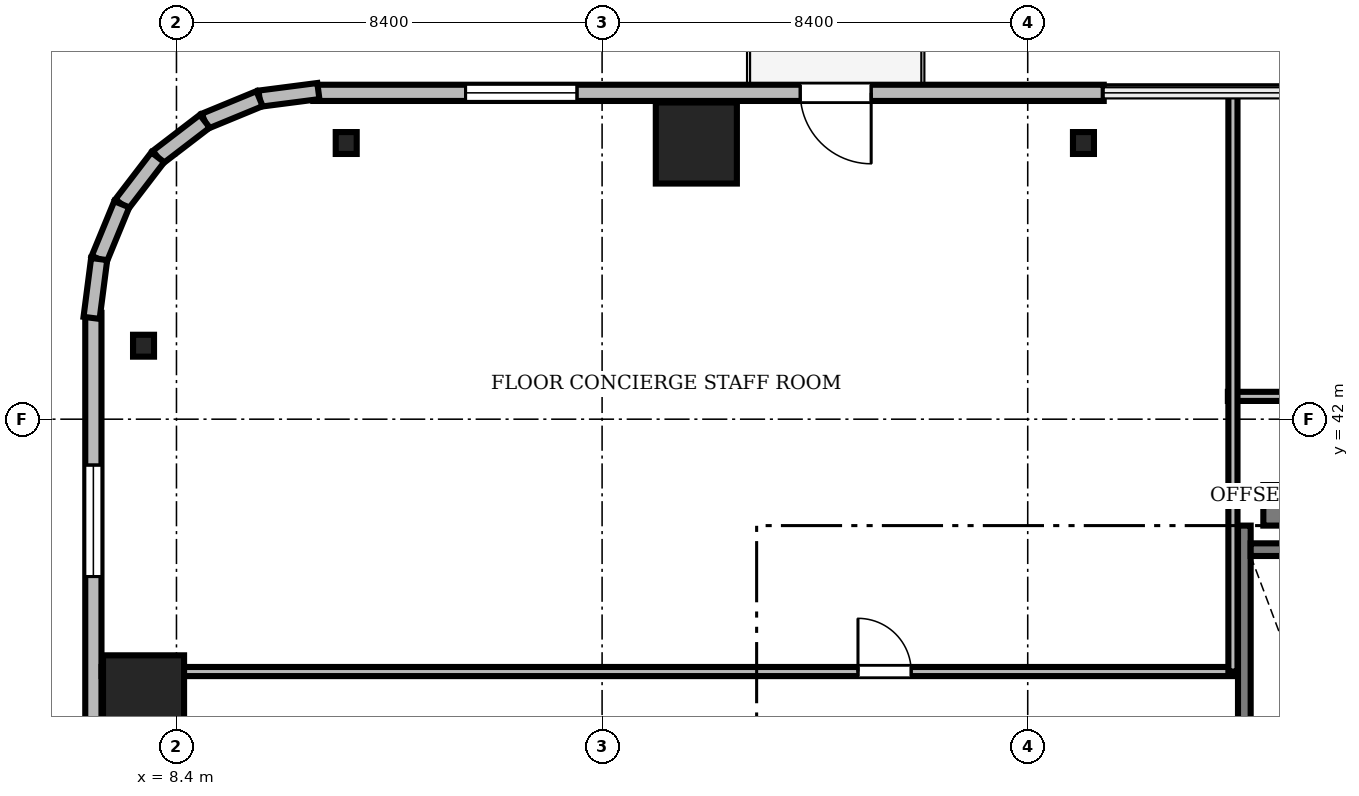
"""IFC4 building model, lengths in metres.
Left out: names, types, materials, properties, quantities, classifications, styles, units other than length and angle.
Written with IfcOpenShell. Run it as: python <this file> out.ifc"""

import sys

from ifc_helpers import new_model, si_unit, direction, frame, frame_2d, origin, origin_2d, place, context, subcontext, project, spatial, rectangle, i_section, extrude, source, transform, mapped, element, fill, save


model = new_model("IFC4")
c1 = context("Model", 3, precision=1e-05, world=origin(), true_north=direction((0.0, 1.0)))
c2 = subcontext(c1, "Body", "Model", "MODEL_VIEW")
j1 = project(units=[si_unit("LENGTHUNIT", "METRE"), si_unit("PLANEANGLEUNIT", "RADIAN")], contexts=[c1])
p1 = place(None, origin())
s1 = spatial("IfcSite", under=j1, at=p1, CompositionType="ELEMENT")
p2 = place(p1, origin())
s2 = spatial("IfcBuilding", under=s1, at=p2, CompositionType="ELEMENT")
p3 = place(p2, frame((0.0, 0.0, 159.4)))
s3 = spatial("IfcBuildingStorey", under=s2, at=p3, CompositionType="ELEMENT", Elevation=159.4)
m1 = source(origin(), c2, "Body", "SweptSolid", [
    extrude(rectangle(XDim=17.52, YDim=0.8, at=frame_2d((8.76, 0.0))), origin(), (0.0, 0.0, 1.0), 3.46),
])
p4 = place(p3, frame((29.85, 40.3, 0.0), z_axis=(0.0, 0.0, 1.0), x_axis=(1.0, 0.0, 0.0)))
e1 = element("IfcWall", 1, at=p4, inside=s3, PredefinedType="SHEAR", context=c2, shape_type="MappedRepresentation", body=[
    mapped(m1, transform((0.0, 0.0, 0.0), scale=1.0)),
])
m2 = source(origin(), c2, "Body", "SweptSolid", [
    extrude(rectangle(XDim=1.6, YDim=1.6, at=origin_2d()), origin(), (0.0, 0.0, 1.0), 3.46),
])
for number, where, z_axis, x_axis in (
    (2, (18.66, 47.45, 0.0), (0.0, 0.0, 1.0), (1.0, 0.0, 0.0)),
    (3, (7.75, 36.54, 0.0), (0.0, 0.0, 1.0), (1.0, 0.0, 0.0)),
):
    element("IfcColumn", number, at=place(p3, frame(where, z_axis=z_axis, x_axis=x_axis)), inside=s3, PredefinedType="COLUMN", context=c2, shape_type="MappedRepresentation", body=[
        mapped(m2, transform((0.0, 0.0, 0.0), scale=1.0)),
    ])
m3 = source(origin(), c2, "Body", "SweptSolid", [
    extrude(i_section(OverallWidth=0.414, OverallDepth=0.432, WebThickness=0.026, FlangeThickness=0.04, FilletRadius=0.015, at=origin_2d()), origin(), (0.0, 0.0, 1.0), 3.46),
])
for number, where, z_axis, x_axis in (
    (4, (26.3, 47.45, 0.0), (0.0, 0.0, 1.0), (1.0, 0.0, 0.0)),
    (5, (11.75, 47.45, 0.0), (0.0, 0.0, 1.0), (1.0, 0.0, 0.0)),
    (6, (7.75, 43.45, 0.0), (0.0, 0.0, 1.0), (1.0, 0.0, 0.0)),
):
    element("IfcColumn", number, at=place(p3, frame(where, z_axis=z_axis, x_axis=x_axis)), inside=s3, PredefinedType="COLUMN", context=c2, shape_type="MappedRepresentation", body=[
        mapped(m3, transform((0.0, 0.0, 0.0), scale=1.0)),
    ])
m4 = source(origin(), c2, "Body", "SweptSolid", [
    extrude(rectangle(XDim=15.6, YDim=0.32, at=frame_2d((7.8, 0.0))), origin(), (0.0, 0.0, 1.0), 3.46),
])
p5 = place(p3, frame((26.7, 48.44, 0.0), z_axis=(0.0, 0.0, 1.0), x_axis=(-1.0, 0.0, 0.0)))
e7 = element("IfcWall", 7, at=p5, inside=s3, PredefinedType="SOLIDWALL", context=c2, shape_type="MappedRepresentation", body=[
    mapped(m4, transform((0.0, 0.0, 0.0), scale=1.0)),
])
m5 = source(origin(), c2, "Body", "SweptSolid", [
    extrude(rectangle(XDim=1.4, YDim=2.3, at=frame_2d((0.7, 1.15))), frame((0.0, 0.17, 0.0), z_axis=(0.0, -1.0, 0.0), x_axis=(1.0, 0.0, 0.0)), (0.0, 0.0, 1.0), 0.34),
])
p6 = place(p5, frame((4.59, 0.0, 0.0)))
e8 = element("IfcOpeningElement", 8, at=p6, cuts=e7, PredefinedType="OPENING", context=c2, shape_type="MappedRepresentation", body=[
    mapped(m5, transform((0.0, 0.0, 0.0), scale=1.0)),
])
m6 = source(origin(), c2, "Body", "SweptSolid", [
    extrude(rectangle(XDim=2.2, YDim=2.4, at=frame_2d((1.1, 1.2))), frame((0.0, 0.17, 0.0), z_axis=(0.0, -1.0, 0.0), x_axis=(1.0, 0.0, 0.0)), (0.0, 0.0, 1.0), 0.34),
])
p7 = place(p5, frame((10.395, 0.0, 0.72)))
e9 = element("IfcOpeningElement", 9, at=p7, cuts=e7, PredefinedType="OPENING", context=c2, shape_type="MappedRepresentation", body=[
    mapped(m6, transform((0.0, 0.0, 0.0), scale=1.0)),
])
m7 = source(origin(), c2, "Body", "SweptSolid", [
    extrude(rectangle(XDim=15.6, YDim=0.32, at=frame_2d((7.8, 0.0))), origin(), (0.0, 0.0, 1.0), 3.46),
])
p8 = place(p3, frame((6.76, 44.1, 0.0), z_axis=(0.0, 0.0, 1.0), x_axis=(0.0, -1.0, 0.0)))
e10 = element("IfcWall", 10, at=p8, inside=s3, PredefinedType="SOLIDWALL", context=c2, shape_type="MappedRepresentation", body=[
    mapped(m7, transform((0.0, 0.0, 0.0), scale=1.0)),
])
p9 = place(p8, frame((3.005, 0.0, 0.72)))
e11 = element("IfcOpeningElement", 11, at=p9, cuts=e10, PredefinedType="OPENING", context=c2, shape_type="MappedRepresentation", body=[
    mapped(m6, transform((0.0, 0.0, 0.0), scale=1.0)),
])
m8 = source(origin(), c2, "Body", "SweptSolid", [
    extrude(rectangle(XDim=1.17, YDim=0.32, at=frame_2d((0.585, 0.0))), origin(), (0.0, 0.0, 1.0), 3.46),
])
p10 = place(p3, frame((11.2, 48.476, 0.0), z_axis=(0.0, 0.0, 1.0), x_axis=(-0.991735963317, -0.128295670475, 0.0)))
e12 = element("IfcWall", 12, at=p10, inside=s3, PredefinedType="SOLIDWALL", context=c2, shape_type="MappedRepresentation", body=[
    mapped(m8, transform((0.0, 0.0, 0.0), scale=1.0)),
])
m9 = source(origin(), c2, "Body", "SweptSolid", [
    extrude(rectangle(XDim=1.169, YDim=0.32, at=frame_2d((0.584, 0.0))), origin(), (0.0, 0.0, 1.0), 3.46),
])
p11 = place(p3, frame((10.04, 48.325, 0.0), z_axis=(0.0, 0.0, 1.0), x_axis=(-0.924552646638, -0.381054331552, 0.0)))
e13 = element("IfcWall", 13, at=p11, inside=s3, PredefinedType="SOLIDWALL", context=c2, shape_type="MappedRepresentation", body=[
    mapped(m9, transform((0.0, 0.0, 0.0), scale=1.0)),
])
m10 = source(origin(), c2, "Body", "SweptSolid", [
    extrude(rectangle(XDim=1.169, YDim=0.32, at=frame_2d((0.584, 0.0))), origin(), (0.0, 0.0, 1.0), 3.46),
])
p12 = place(p3, frame((8.959, 47.88, 0.0), z_axis=(0.0, 0.0, 1.0), x_axis=(-0.793663520347, -0.608356981114, 0.0)))
e14 = element("IfcWall", 14, at=p12, inside=s3, PredefinedType="SOLIDWALL", context=c2, shape_type="MappedRepresentation", body=[
    mapped(m10, transform((0.0, 0.0, 0.0), scale=1.0)),
])
m11 = source(origin(), c2, "Body", "SweptSolid", [
    extrude(rectangle(XDim=1.169, YDim=0.32, at=frame_2d((0.584, 0.0))), origin(), (0.0, 0.0, 1.0), 3.46),
])
p13 = place(p3, frame((8.031, 47.169, 0.0), z_axis=(0.0, 0.0, 1.0), x_axis=(-0.608387696831, -0.793639975269, 0.0)))
e15 = element("IfcWall", 15, at=p13, inside=s3, PredefinedType="SOLIDWALL", context=c2, shape_type="MappedRepresentation", body=[
    mapped(m11, transform((0.0, 0.0, 0.0), scale=1.0)),
])
p14 = place(p3, frame((7.32, 46.241, 0.0), z_axis=(0.0, 0.0, 1.0), x_axis=(-0.381054331552, -0.924552646638, 0.0)))
e16 = element("IfcWall", 16, at=p14, inside=s3, PredefinedType="SOLIDWALL", context=c2, shape_type="MappedRepresentation", body=[
    mapped(m9, transform((0.0, 0.0, 0.0), scale=1.0)),
])
p15 = place(p3, frame((6.875, 45.16, 0.0), z_axis=(0.0, 0.0, 1.0), x_axis=(-0.128295670475, -0.991735963317, 0.0)))
e17 = element("IfcWall", 17, at=p15, inside=s3, PredefinedType="SOLIDWALL", context=c2, shape_type="MappedRepresentation", body=[
    mapped(m8, transform((0.0, 0.0, 0.0), scale=1.0)),
])
m12 = source(origin(), c2, "Body", "SweptSolid", [
    extrude(rectangle(XDim=9.25, YDim=0.25, at=frame_2d((4.625, 0.0))), origin(), (0.0, 0.0, 1.0), 3.5),
])
p16 = place(p3, frame((29.475, 30.65, 0.0), z_axis=(0.0, 0.0, 1.0), x_axis=(0.0, 1.0, 0.0)))
e18 = element("IfcWall", 18, at=p16, inside=s3, PredefinedType="SOLIDWALL", context=c2, shape_type="MappedRepresentation", body=[
    mapped(m12, transform((0.0, 0.0, 0.0), scale=1.0)),
])
m13 = source(origin(), c2, "Body", "SweptSolid", [
    extrude(rectangle(XDim=3.15, YDim=0.25, at=frame_2d((1.575, 0.0))), origin(), (0.0, 0.0, 1.0), 3.5),
])
p17 = place(p3, frame((29.6, 39.425, 0.0), z_axis=(0.0, 0.0, 1.0), x_axis=(1.0, 0.0, 0.0)))
e19 = element("IfcWall", 19, at=p17, inside=s3, PredefinedType="SOLIDWALL", context=c2, shape_type="MappedRepresentation", body=[
    mapped(m13, transform((0.0, 0.0, 0.0), scale=1.0)),
])
m14 = source(origin(), c2, "Body", "SweptSolid", [
    extrude(rectangle(XDim=23.928, YDim=0.18, at=frame_2d((11.964, 0.0))), origin(), (0.0, 0.0, 1.0), 2.702),
])
p18 = place(p3, frame((29.15, 42.45, 0.0), z_axis=(0.0, 0.0, 1.0), x_axis=(1.0, 0.0, 0.0)))
e20 = element("IfcWall", 20, at=p18, inside=s3, PredefinedType="PARTITIONING", context=c2, shape_type="MappedRepresentation", body=[
    mapped(m14, transform((0.0, 0.0, 0.0), scale=1.0)),
])
m15 = source(origin(), c2, "Body", "SweptSolid", [
    extrude(rectangle(XDim=1.05, YDim=2.2, at=frame_2d((0.525, 1.1))), frame((0.0, 0.1, 0.0), z_axis=(0.0, -1.0, 0.0), x_axis=(1.0, 0.0, 0.0)), (0.0, 0.0, 1.0), 0.2),
])
p19 = place(p18, frame((4.5, 0.0, 0.0)))
e21 = element("IfcOpeningElement", 21, at=p19, cuts=e20, PredefinedType="OPENING", context=c2, shape_type="MappedRepresentation", body=[
    mapped(m15, transform((0.0, 0.0, 0.0), scale=1.0)),
])
m16 = source(origin(), c2, "Body", "SweptSolid", [
    extrude(rectangle(XDim=22.328, YDim=0.18, at=frame_2d((11.164, 0.0))), origin(), (0.0, 0.0, 1.0), 2.702),
])
p20 = place(p3, frame((6.922, 37.02, 0.0), z_axis=(0.0, 0.0, 1.0), x_axis=(1.0, 0.0, 0.0)))
e22 = element("IfcWall", 22, at=p20, inside=s3, PredefinedType="PARTITIONING", context=c2, shape_type="MappedRepresentation", body=[
    mapped(m16, transform((0.0, 0.0, 0.0), scale=1.0)),
])
p21 = place(p20, frame((14.928, 0.0, 0.0)))
e23 = element("IfcOpeningElement", 23, at=p21, cuts=e22, PredefinedType="OPENING", context=c2, shape_type="MappedRepresentation", body=[
    mapped(m15, transform((0.0, 0.0, 0.0), scale=1.0)),
])
m17 = source(origin(), c2, "Body", "SweptSolid", [
    extrude(rectangle(XDim=11.45, YDim=0.18, at=frame_2d((5.725, 0.0))), origin(), (0.0, 0.0, 1.0), 2.702),
])
p22 = place(p3, frame((29.25, 37.02, 0.0), z_axis=(0.0, 0.0, 1.0), x_axis=(0.0, 1.0, 0.0)))
e24 = element("IfcWall", 24, at=p22, inside=s3, PredefinedType="PARTITIONING", context=c2, shape_type="MappedRepresentation", body=[
    mapped(m17, transform((0.0, 0.0, 0.0), scale=1.0)),
])
m18 = source(origin(), c2, "Body", "SweptSolid", [
    extrude(rectangle(XDim=1.4, YDim=2.3, at=frame_2d((0.7, 1.15))), frame((0.0, 0.025, 0.0), z_axis=(0.0, -1.0, 0.0), x_axis=(1.0, 0.0, 0.0)), (0.0, 0.0, 1.0), 0.05),
])
p23 = place(p6, frame((1.4, 0.0, 0.0), z_axis=(0.0, 0.0, 1.0), x_axis=(-1.0, 0.0, 0.0)))
e25 = element("IfcDoor", 25, at=p23, inside=s3, OperationType="DOUBLE_DOOR_SLIDING", PredefinedType="DOOR", context=c2, shape_type="MappedRepresentation", body=[
    mapped(m18, transform((0.0, 0.0, 0.0), scale=1.0)),
])
fill(e8, e25)
m19 = source(origin(), c2, "Body", "SweptSolid", [
    extrude(rectangle(XDim=2.2, YDim=2.4, at=frame_2d((1.1, 1.2))), frame((0.0, 0.03, 0.0), z_axis=(0.0, -1.0, 0.0), x_axis=(1.0, 0.0, 0.0)), (0.0, 0.0, 1.0), 0.06),
])
p24 = place(p7, origin())
e26 = element("IfcWindow", 26, at=p24, inside=s3, PartitioningType="SINGLE_PANEL", PredefinedType="WINDOW", context=c2, shape_type="MappedRepresentation", body=[
    mapped(m19, transform((0.0, 0.0, 0.0), scale=1.0)),
])
fill(e9, e26)
p25 = place(p9, origin())
e27 = element("IfcWindow", 27, at=p25, inside=s3, PartitioningType="SINGLE_PANEL", PredefinedType="WINDOW", context=c2, shape_type="MappedRepresentation", body=[
    mapped(m19, transform((0.0, 0.0, 0.0), scale=1.0)),
])
fill(e11, e27)
m20 = source(origin(), c2, "Body", "SweptSolid", [
    extrude(rectangle(XDim=1.05, YDim=2.2, at=frame_2d((0.525, 1.1))), frame((0.0, 0.025, 0.0), z_axis=(0.0, -1.0, 0.0), x_axis=(1.0, 0.0, 0.0)), (0.0, 0.0, 1.0), 0.05),
])
p26 = place(p21, origin())
e28 = element("IfcDoor", 28, at=p26, inside=s3, OperationType="SINGLE_SWING_LEFT", PredefinedType="DOOR", context=c2, shape_type="MappedRepresentation", body=[
    mapped(m20, transform((0.0, 0.0, 0.0), scale=1.0)),
])
fill(e23, e28)
save(model, sys.argv[1])
